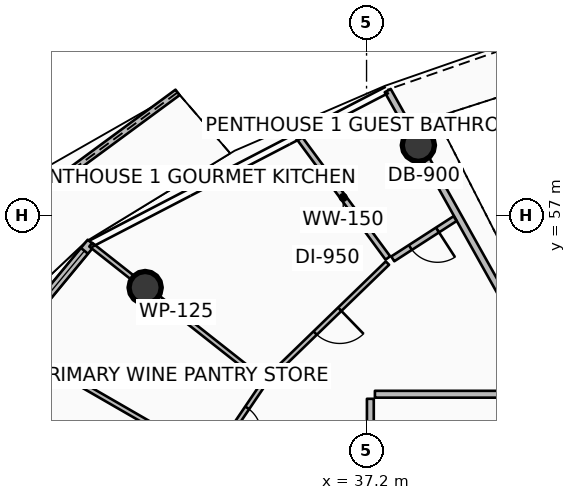
"""IFC4 building model, lengths in metres.
Left out: names, types, materials, properties, quantities, classifications, styles, units other than length and angle.
Written with IfcOpenShell. Run it as: python <this file> out.ifc"""

import sys

from ifc_helpers import new_model, si_unit, direction, frame, frame_2d, origin, origin_2d, place, context, subcontext, project, spatial, polyline, rectangle, circle, outline, extrude, element, fill, save


model = new_model("IFC4")
c1 = context("Model", 3, precision=1e-05, world=origin(), true_north=direction((0.0, 1.0)))
c2 = subcontext(c1, "Body", "Model", "MODEL_VIEW")
j1 = project(units=[si_unit("LENGTHUNIT", "METRE"), si_unit("PLANEANGLEUNIT", "RADIAN")], contexts=[c1])
p1 = place(None, origin())
s1 = spatial("IfcSite", under=j1, at=p1, CompositionType="ELEMENT")
p2 = place(p1, origin())
s2 = spatial("IfcBuilding", under=s1, at=p2, CompositionType="ELEMENT")
p3 = place(p2, frame((0.0, 0.0, 326.3)))
s3 = spatial("IfcBuildingStorey", under=s2, at=p3, CompositionType="ELEMENT", Elevation=326.3)
for number, where, z_axis, x_axis in (
    (1, (38.563, 58.851, 0.0), (0.0, 0.0, 1.0), (1.0, 0.0, 0.0)),
    (2, (31.374, 55.107, 0.0), (0.0, 0.0, 1.0), (1.0, 0.0, 0.0)),
):
    element("IfcColumn", number, at=place(p3, frame(where, z_axis=z_axis, x_axis=x_axis)), inside=s3, PredefinedType="COLUMN", context=c2, shape_type="SweptSolid", body=[
        extrude(circle(Radius=0.425, at=origin_2d()), origin(), (0.0, 0.0, 1.0), 3.94),
    ])
p4 = place(p3, frame((32.227, 60.241, 0.0), z_axis=(0.0, 0.0, 1.0), x_axis=(-0.805132760075, -0.593094628752, 0.0)))
e3 = element("IfcWall", 3, at=p4, inside=s3, PredefinedType="PARAPET", context=c2, shape_type="SweptSolid", body=[
    extrude(outline(polyline([(0.0, 0.0), (10.051, 0.0), (10.051, 1.832), (5.025, 1.696), (0.0, 1.497), (0.0, 0.0)])), frame((0.0, 0.09, 0.0), z_axis=(0.0, -1.0, 0.0), x_axis=(1.0, 0.0, 0.0)), (0.0, 0.0, 1.0), 0.18),
])
p5 = place(p3, frame((29.955, 56.289, 0.0), z_axis=(0.0, 0.0, 1.0), x_axis=(-0.636803612721, -0.771026042897, 0.0)))
e4 = element("IfcWall", 4, at=p5, inside=s3, PredefinedType="SOLIDWALL", context=c2, shape_type="SweptSolid", body=[
    extrude(rectangle(XDim=9.728, YDim=0.24, at=frame_2d((4.864, 0.0))), origin(), (0.0, 0.0, 1.0), 2.89),
])
p6 = place(p5, frame((7.508, 0.0, 0.0)))
e5 = element("IfcOpeningElement", 5, at=p6, cuts=e4, PredefinedType="OPENING", context=c2, shape_type="SweptSolid", body=[
    extrude(rectangle(XDim=1.45, YDim=2.15, at=frame_2d((0.725, 1.075))), frame((0.0, 0.13, 0.0), z_axis=(0.0, -1.0, 0.0), x_axis=(1.0, 0.0, 0.0)), (0.0, 0.0, 1.0), 0.26),
])
p7 = place(p5, frame((0.28, 0.0, 0.65)))
e6 = element("IfcOpeningElement", 6, at=p7, cuts=e4, PredefinedType="OPENING", context=c2, shape_type="SweptSolid", body=[
    extrude(rectangle(XDim=1.6, YDim=1.5, at=frame_2d((0.8, 0.75))), frame((0.0, 0.13, 0.0), z_axis=(0.0, -1.0, 0.0), x_axis=(1.0, 0.0, 0.0)), (0.0, 0.0, 1.0), 0.26),
])
p8 = place(p3, frame((42.232, 52.3, 0.0), z_axis=(0.0, 0.0, 1.0), x_axis=(-0.488623665245, 0.872494649704, 0.0)))
e7 = element("IfcWall", 7, at=p8, inside=s3, PredefinedType="PARTITIONING", context=c2, shape_type="SweptSolid", body=[
    extrude(rectangle(XDim=9.157, YDim=0.18, at=frame_2d((4.579, 0.0))), origin(), (0.0, 0.0, 1.0), 3.38),
])
p9 = place(p3, frame((42.112, 52.3, 0.0), z_axis=(0.0, 0.0, 1.0), x_axis=(-1.0, 0.0, 0.0)))
e8 = element("IfcWall", 8, at=p9, inside=s3, PredefinedType="PARTITIONING", context=c2, shape_type="SweptSolid", body=[
    extrude(rectangle(XDim=4.692, YDim=0.18, at=frame_2d((2.346, 0.0))), origin(), (0.0, 0.0, 1.0), 3.38),
])
p10 = place(p3, frame((37.3, 52.18, 0.0), z_axis=(0.0, 0.0, 1.0), x_axis=(0.0, -1.0, 0.0)))
e9 = element("IfcWall", 9, at=p10, inside=s3, PredefinedType="PARTITIONING", context=c2, shape_type="SweptSolid", body=[
    extrude(rectangle(XDim=1.625, YDim=0.18, at=frame_2d((0.812, 0.0))), origin(), (0.0, 0.0, 1.0), 3.38),
])
p11 = place(p3, frame((39.53, 56.92, 0.0), z_axis=(0.0, 0.0, 1.0), x_axis=(-0.840344430655, -0.542052799889, 0.0)))
e10 = element("IfcWall", 10, at=p11, inside=s3, PredefinedType="PARTITIONING", context=c2, shape_type="SweptSolid", body=[
    extrude(rectangle(XDim=1.952, YDim=0.15, at=frame_2d((0.976, 0.0))), origin(), (0.0, 0.0, 1.0), 3.38),
])
p12 = place(p11, frame((0.551, 0.0, 0.0)))
e11 = element("IfcOpeningElement", 11, at=p12, cuts=e10, PredefinedType="OPENING", context=c2, shape_type="SweptSolid", body=[
    extrude(rectangle(XDim=0.85, YDim=2.06, at=frame_2d((0.425, 1.03))), frame((0.0, 0.085, 0.0), z_axis=(0.0, -1.0, 0.0), x_axis=(1.0, 0.0, 0.0)), (0.0, 0.0, 1.0), 0.17),
])
p13 = place(p3, frame((37.76, 55.886, 0.0), z_axis=(0.0, 0.0, 1.0), x_axis=(-0.593476725003, 0.804851152002, 0.0)))
e12 = element("IfcWall", 12, at=p13, inside=s3, PredefinedType="PARTITIONING", context=c2, shape_type="SweptSolid", body=[
    extrude(rectangle(XDim=3.958, YDim=0.15, at=frame_2d((1.979, 0.0))), origin(), (0.0, 0.0, 1.0), 3.38),
])
p14 = place(p3, frame((37.749, 55.751, 0.0), z_axis=(0.0, 0.0, 1.0), x_axis=(-0.718380815069, -0.695650058967, 0.0)))
e13 = element("IfcWall", 13, at=p14, inside=s3, PredefinedType="PARTITIONING", context=c2, shape_type="SweptSolid", body=[
    extrude(rectangle(XDim=4.393, YDim=0.125, at=frame_2d((2.196, 0.0))), origin(), (0.0, 0.0, 1.0), 3.38),
])
p15 = place(p14, frame((1.746, 0.0, 0.0)))
e14 = element("IfcOpeningElement", 14, at=p15, cuts=e13, PredefinedType="OPENING", context=c2, shape_type="SweptSolid", body=[
    extrude(rectangle(XDim=0.9, YDim=2.08, at=frame_2d((0.45, 1.04))), frame((0.0, 0.073, 0.0), z_axis=(0.0, -1.0, 0.0), x_axis=(1.0, 0.0, 0.0)), (0.0, 0.0, 1.0), 0.145),
])
p16 = place(p3, frame((34.443, 52.688, 0.0), z_axis=(0.0, 0.0, 1.0), x_axis=(-0.785329715116, 0.61907773224, 0.0)))
e15 = element("IfcWall", 15, at=p16, inside=s3, PredefinedType="PARTITIONING", context=c2, shape_type="SweptSolid", body=[
    extrude(rectangle(XDim=5.73, YDim=0.125, at=frame_2d((2.865, 0.0))), origin(), (0.0, 0.0, 1.0), 3.38),
])
p17 = place(p3, frame((33.054, 50.619, 0.0), z_axis=(0.0, 0.0, 1.0), x_axis=(-0.86627763932, 0.499562860524, 0.0)))
e16 = element("IfcWall", 16, at=p17, inside=s3, PredefinedType="PARTITIONING", context=c2, shape_type="SweptSolid", body=[
    extrude(rectangle(XDim=5.96, YDim=0.125, at=frame_2d((2.98, 0.0))), origin(), (0.0, 0.0, 1.0), 3.38),
])
p18 = place(p3, frame((34.466, 52.543, 0.0), z_axis=(0.0, 0.0, 1.0), x_axis=(-0.560789421623, -0.827958467917, 0.0)))
e17 = element("IfcWall", 17, at=p18, inside=s3, PredefinedType="PARTITIONING", context=c2, shape_type="SweptSolid", body=[
    extrude(rectangle(XDim=2.298, YDim=0.125, at=frame_2d((1.149, 0.0))), origin(), (0.0, 0.0, 1.0), 3.38),
])
p19 = place(p18, frame((0.724, 0.0, 0.0)))
e18 = element("IfcOpeningElement", 18, at=p19, cuts=e17, PredefinedType="OPENING", context=c2, shape_type="SweptSolid", body=[
    extrude(rectangle(XDim=0.85, YDim=2.06, at=frame_2d((0.425, 1.03))), frame((0.0, 0.073, 0.0), z_axis=(0.0, -1.0, 0.0), x_axis=(1.0, 0.0, 0.0)), (0.0, 0.0, 1.0), 0.145),
])
p20 = place(p7, origin())
e19 = element("IfcWindow", 19, at=p20, inside=s3, PartitioningType="SINGLE_PANEL", PredefinedType="WINDOW", context=c2, shape_type="SweptSolid", body=[
    extrude(rectangle(XDim=1.6, YDim=1.5, at=frame_2d((0.8, 0.75))), frame((0.0, 0.03, 0.0), z_axis=(0.0, -1.0, 0.0), x_axis=(1.0, 0.0, 0.0)), (0.0, 0.0, 1.0), 0.06),
])
fill(e6, e19)
p21 = place(p12, origin())
e20 = element("IfcDoor", 20, at=p21, inside=s3, OperationType="SINGLE_SWING_LEFT", PredefinedType="DOOR", context=c2, shape_type="SweptSolid", body=[
    extrude(rectangle(XDim=0.85, YDim=2.06, at=frame_2d((0.425, 1.03))), frame((0.0, 0.025, 0.0), z_axis=(0.0, -1.0, 0.0), x_axis=(1.0, 0.0, 0.0)), (0.0, 0.0, 1.0), 0.05),
])
fill(e11, e20)
p22 = place(p15, origin())
e21 = element("IfcDoor", 21, at=p22, inside=s3, OperationType="SINGLE_SWING_LEFT", PredefinedType="DOOR", context=c2, shape_type="SweptSolid", body=[
    extrude(rectangle(XDim=0.9, YDim=2.08, at=frame_2d((0.45, 1.04))), frame((0.0, 0.025, 0.0), z_axis=(0.0, -1.0, 0.0), x_axis=(1.0, 0.0, 0.0)), (0.0, 0.0, 1.0), 0.05),
])
fill(e14, e21)
p23 = place(p19, origin())
e22 = element("IfcDoor", 22, at=p23, inside=s3, OperationType="SINGLE_SWING_RIGHT", PredefinedType="DOOR", context=c2, shape_type="SweptSolid", body=[
    extrude(rectangle(XDim=0.85, YDim=2.06, at=frame_2d((0.425, 1.03))), frame((0.0, 0.025, 0.0), z_axis=(0.0, -1.0, 0.0), x_axis=(1.0, 0.0, 0.0)), (0.0, 0.0, 1.0), 0.05),
])
fill(e18, e22)
save(model, sys.argv[1])
